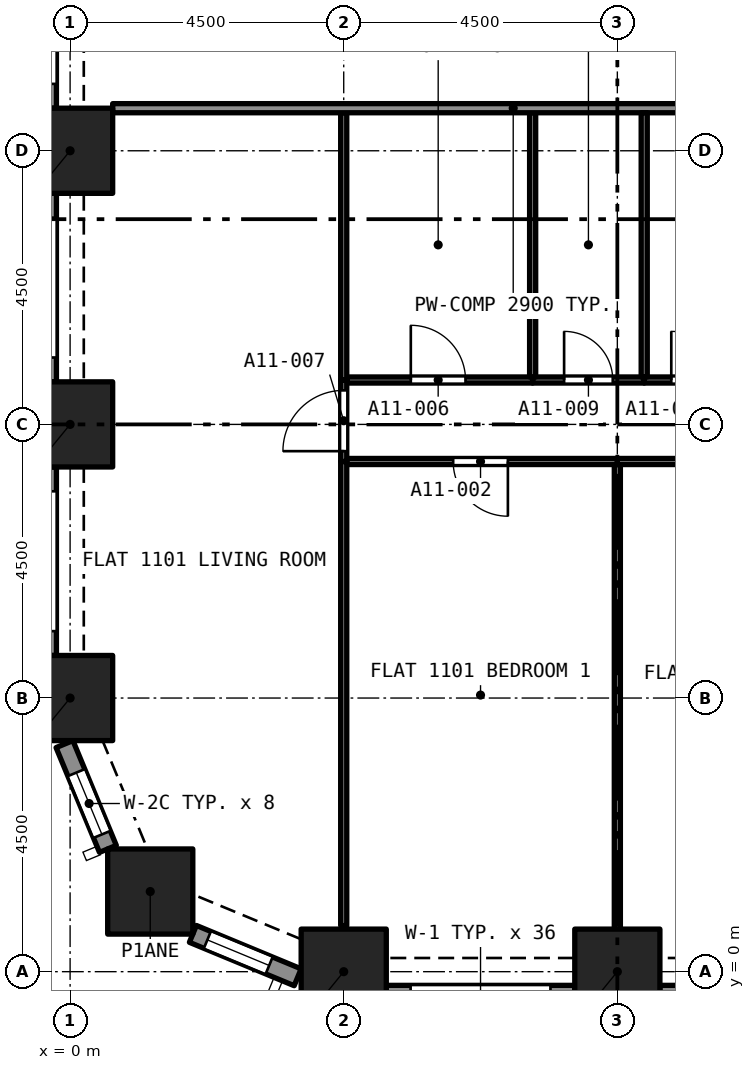
"""IFC4 building model, lengths in metres.
Left out: names, types, materials, properties, quantities, classifications, styles, units other than length and angle.
Written with IfcOpenShell. Run it as: python <this file> out.ifc"""

import sys

from ifc_helpers import new_model, si_unit, direction, frame, frame_2d, origin, origin_2d, place, context, subcontext, project, spatial, rectangle, extrude, element, fill, save


model = new_model("IFC4")
c1 = context("Model", 3, precision=1e-05, world=origin(), true_north=direction((0.0, 1.0)))
c2 = subcontext(c1, "Body", "Model", "MODEL_VIEW")
j1 = project(units=[si_unit("LENGTHUNIT", "METRE"), si_unit("PLANEANGLEUNIT", "RADIAN")], contexts=[c1])
p1 = place(None, origin())
s1 = spatial("IfcSite", under=j1, at=p1, CompositionType="ELEMENT")
p2 = place(p1, origin())
s2 = spatial("IfcBuilding", under=s1, at=p2, CompositionType="ELEMENT")
p3 = place(p2, frame((0.0, 0.0, 46.4)))
s3 = spatial("IfcBuildingStorey", under=s2, at=p3, CompositionType="ELEMENT", Elevation=46.4)
for number, where, z_axis, x_axis in (
    (1, (4.5, 0.0, 0.0), (0.0, 0.0, 1.0), (1.0, 0.0, 0.0)),
    (2, (9.0, 0.0, 0.0), (0.0, 0.0, 1.0), (1.0, 0.0, 0.0)),
    (3, (1.318, 1.318, 0.0), (0.0, 0.0, 1.0), (1.0, 0.0, 0.0)),
    (4, (0.0, 4.5, 0.0), (0.0, 0.0, 1.0), (1.0, 0.0, 0.0)),
    (5, (0.0, 9.0, 0.0), (0.0, 0.0, 1.0), (1.0, 0.0, 0.0)),
    (6, (0.0, 13.5, 0.0), (0.0, 0.0, 1.0), (1.0, 0.0, 0.0)),
):
    element("IfcColumn", number, at=place(p3, frame(where, z_axis=z_axis, x_axis=x_axis)), inside=s3, PredefinedType="COLUMN", context=c2, shape_type="SweptSolid", body=[
        extrude(rectangle(XDim=1.4, YDim=1.4, at=origin_2d()), origin(), (0.0, 0.0, 1.0), 3.2),
    ])
p4 = place(p3, frame((0.622, 2.02, 0.0), z_axis=(0.0, 0.0, 1.0), x_axis=(-0.38262540684, 0.923903565336, 0.0)))
e7 = element("IfcWall", 7, at=p4, inside=s3, PredefinedType="SOLIDWALL", context=c2, shape_type="SweptSolid", body=[
    extrude(rectangle(XDim=1.865, YDim=0.3, at=frame_2d((0.933, 0.0))), origin(), (0.0, 0.0, 1.0), 3.2),
])
p5 = place(p4, frame((0.258, 0.0, 0.45)))
e8 = element("IfcOpeningElement", 8, at=p5, cuts=e7, PredefinedType="OPENING", context=c2, shape_type="SweptSolid", body=[
    extrude(rectangle(XDim=1.1, YDim=1.95, at=frame_2d((0.55, 0.975))), frame((0.0, 0.16, 0.0), z_axis=(0.0, -1.0, 0.0), x_axis=(1.0, 0.0, 0.0)), (0.0, 0.0, 1.0), 0.32),
])
p6 = place(p3, frame((3.743, -0.092, 0.0), z_axis=(0.0, 0.0, 1.0), x_axis=(-0.923857286003, 0.382737135771, 0.0)))
e9 = element("IfcWall", 9, at=p6, inside=s3, PredefinedType="SOLIDWALL", context=c2, shape_type="SweptSolid", body=[
    extrude(rectangle(XDim=1.865, YDim=0.3, at=frame_2d((0.933, 0.0))), origin(), (0.0, 0.0, 1.0), 3.2),
])
p7 = place(p6, frame((0.508, 0.0, 0.45)))
e10 = element("IfcOpeningElement", 10, at=p7, cuts=e9, PredefinedType="OPENING", context=c2, shape_type="SweptSolid", body=[
    extrude(rectangle(XDim=1.1, YDim=1.95, at=frame_2d((0.55, 0.975))), frame((0.0, 0.16, 0.0), z_axis=(0.0, -1.0, 0.0), x_axis=(1.0, 0.0, 0.0)), (0.0, 0.0, 1.0), 0.32),
])
p8 = place(p3, frame((8.3, -0.375, 0.0), z_axis=(0.0, 0.0, 1.0), x_axis=(-1.0, 0.0, 0.0)))
e11 = element("IfcWall", 11, at=p8, inside=s3, PredefinedType="SOLIDWALL", context=c2, shape_type="SweptSolid", body=[
    extrude(rectangle(XDim=3.1, YDim=0.3, at=frame_2d((1.55, 0.0))), origin(), (0.0, 0.0, 1.0), 3.2),
])
p9 = place(p8, frame((0.4, 0.0, 0.45)))
e12 = element("IfcOpeningElement", 12, at=p9, cuts=e11, PredefinedType="OPENING", context=c2, shape_type="SweptSolid", body=[
    extrude(rectangle(XDim=2.3, YDim=1.95, at=frame_2d((1.15, 0.975))), frame((0.0, 0.16, 0.0), z_axis=(0.0, -1.0, 0.0), x_axis=(1.0, 0.0, 0.0)), (0.0, 0.0, 1.0), 0.32),
])
p10 = place(p3, frame((12.8, -0.375, 0.0), z_axis=(0.0, 0.0, 1.0), x_axis=(-1.0, 0.0, 0.0)))
e13 = element("IfcWall", 13, at=p10, inside=s3, PredefinedType="SOLIDWALL", context=c2, shape_type="SweptSolid", body=[
    extrude(rectangle(XDim=3.1, YDim=0.3, at=frame_2d((1.55, 0.0))), origin(), (0.0, 0.0, 1.0), 3.2),
])
p11 = place(p10, frame((0.4, 0.0, 0.45)))
e14 = element("IfcOpeningElement", 14, at=p11, cuts=e13, PredefinedType="OPENING", context=c2, shape_type="SweptSolid", body=[
    extrude(rectangle(XDim=2.3, YDim=1.95, at=frame_2d((1.15, 0.975))), frame((0.0, 0.16, 0.0), z_axis=(0.0, -1.0, 0.0), x_axis=(1.0, 0.0, 0.0)), (0.0, 0.0, 1.0), 0.32),
])
p12 = place(p3, frame((-0.375, 14.2, 0.0), z_axis=(0.0, 0.0, 1.0), x_axis=(0.0, 1.0, 0.0)))
e15 = element("IfcWall", 15, at=p12, inside=s3, PredefinedType="SOLIDWALL", context=c2, shape_type="SweptSolid", body=[
    extrude(rectangle(XDim=3.1, YDim=0.3, at=frame_2d((1.55, 0.0))), origin(), (0.0, 0.0, 1.0), 3.2),
])
p13 = place(p12, frame((0.4, 0.0, 0.45)))
e16 = element("IfcOpeningElement", 16, at=p13, cuts=e15, PredefinedType="OPENING", context=c2, shape_type="SweptSolid", body=[
    extrude(rectangle(XDim=2.3, YDim=1.95, at=frame_2d((1.15, 0.975))), frame((0.0, 0.16, 0.0), z_axis=(0.0, -1.0, 0.0), x_axis=(1.0, 0.0, 0.0)), (0.0, 0.0, 1.0), 0.32),
])
p14 = place(p3, frame((-0.375, 9.7, 0.0), z_axis=(0.0, 0.0, 1.0), x_axis=(0.0, 1.0, 0.0)))
e17 = element("IfcWall", 17, at=p14, inside=s3, PredefinedType="SOLIDWALL", context=c2, shape_type="SweptSolid", body=[
    extrude(rectangle(XDim=3.1, YDim=0.3, at=frame_2d((1.55, 0.0))), origin(), (0.0, 0.0, 1.0), 3.2),
])
p15 = place(p14, frame((0.4, 0.0, 0.45)))
e18 = element("IfcOpeningElement", 18, at=p15, cuts=e17, PredefinedType="OPENING", context=c2, shape_type="SweptSolid", body=[
    extrude(rectangle(XDim=2.3, YDim=1.95, at=frame_2d((1.15, 0.975))), frame((0.0, 0.16, 0.0), z_axis=(0.0, -1.0, 0.0), x_axis=(1.0, 0.0, 0.0)), (0.0, 0.0, 1.0), 0.32),
])
p16 = place(p3, frame((-0.375, 5.2, 0.0), z_axis=(0.0, 0.0, 1.0), x_axis=(0.0, 1.0, 0.0)))
e19 = element("IfcWall", 19, at=p16, inside=s3, PredefinedType="SOLIDWALL", context=c2, shape_type="SweptSolid", body=[
    extrude(rectangle(XDim=3.1, YDim=0.3, at=frame_2d((1.55, 0.0))), origin(), (0.0, 0.0, 1.0), 3.2),
])
p17 = place(p16, frame((0.4, 0.0, 0.45)))
e20 = element("IfcOpeningElement", 20, at=p17, cuts=e19, PredefinedType="OPENING", context=c2, shape_type="SweptSolid", body=[
    extrude(rectangle(XDim=2.3, YDim=1.95, at=frame_2d((1.15, 0.975))), frame((0.0, 0.16, 0.0), z_axis=(0.0, -1.0, 0.0), x_axis=(1.0, 0.0, 0.0)), (0.0, 0.0, 1.0), 0.32),
])
p18 = place(p3, frame((9.0, 0.7, 0.0), z_axis=(0.0, 0.0, 1.0), x_axis=(0.0, 1.0, 0.0)))
e21 = element("IfcWall", 21, at=p18, inside=s3, PredefinedType="PARTITIONING", context=c2, shape_type="SweptSolid", body=[
    extrude(rectangle(XDim=7.64, YDim=0.1, at=frame_2d((3.82, 0.0))), origin(), (0.0, 0.0, 1.0), 2.9),
])
p19 = place(p3, frame((9.0, 8.39, 0.0), z_axis=(0.0, 0.0, 1.0), x_axis=(-1.0, 0.0, 0.0)))
e22 = element("IfcWall", 22, at=p19, inside=s3, PredefinedType="PARTITIONING", context=c2, shape_type="SweptSolid", body=[
    extrude(rectangle(XDim=4.45, YDim=0.1, at=frame_2d((2.225, 0.0))), origin(), (0.0, 0.0, 1.0), 2.9),
])
p20 = place(p19, frame((1.8, 0.0, 0.0)))
e23 = element("IfcOpeningElement", 23, at=p20, cuts=e22, PredefinedType="OPENING", context=c2, shape_type="SweptSolid", body=[
    extrude(rectangle(XDim=0.9, YDim=2.1, at=frame_2d((0.45, 1.05))), frame((0.0, 0.06, 0.0), z_axis=(0.0, -1.0, 0.0), x_axis=(1.0, 0.0, 0.0)), (0.0, 0.0, 1.0), 0.12),
])
p21 = place(p3, frame((4.5, 0.758, 0.0), z_axis=(0.0, 0.0, 1.0), x_axis=(0.0, 1.0, 0.0)))
e24 = element("IfcWall", 24, at=p21, inside=s3, PredefinedType="PARTITIONING", context=c2, shape_type="SweptSolid", body=[
    extrude(rectangle(XDim=7.632, YDim=0.1, at=frame_2d((3.816, 0.0))), origin(), (0.0, 0.0, 1.0), 2.9),
])
p22 = place(p3, frame((13.5, 8.39, 0.0), z_axis=(0.0, 0.0, 1.0), x_axis=(-1.0, 0.0, 0.0)))
e25 = element("IfcWall", 25, at=p22, inside=s3, PredefinedType="PARTITIONING", context=c2, shape_type="SweptSolid", body=[
    extrude(rectangle(XDim=4.5, YDim=0.1, at=frame_2d((2.25, 0.0))), origin(), (0.0, 0.0, 1.0), 2.9),
])
p23 = place(p22, frame((1.8, 0.0, 0.0)))
e26 = element("IfcOpeningElement", 26, at=p23, cuts=e25, PredefinedType="OPENING", context=c2, shape_type="SweptSolid", body=[
    extrude(rectangle(XDim=0.9, YDim=2.1, at=frame_2d((0.45, 1.05))), frame((0.0, 0.06, 0.0), z_axis=(0.0, -1.0, 0.0), x_axis=(1.0, 0.0, 0.0)), (0.0, 0.0, 1.0), 0.12),
])
p24 = place(p3, frame((4.55, 9.73, 0.0), z_axis=(0.0, 0.0, 1.0), x_axis=(1.0, 0.0, 0.0)))
e27 = element("IfcWall", 27, at=p24, inside=s3, PredefinedType="PARTITIONING", context=c2, shape_type="SweptSolid", body=[
    extrude(rectangle(XDim=3.057, YDim=0.1, at=frame_2d((1.528, 0.0))), origin(), (0.0, 0.0, 1.0), 2.9),
])
p25 = place(p24, frame((1.053, 0.0, 0.0)))
e28 = element("IfcOpeningElement", 28, at=p25, cuts=e27, PredefinedType="OPENING", context=c2, shape_type="SweptSolid", body=[
    extrude(rectangle(XDim=0.9, YDim=2.1, at=frame_2d((0.45, 1.05))), frame((0.0, 0.06, 0.0), z_axis=(0.0, -1.0, 0.0), x_axis=(1.0, 0.0, 0.0)), (0.0, 0.0, 1.0), 0.12),
])
p26 = place(p3, frame((4.5, 8.39, 0.0), z_axis=(0.0, 0.0, 1.0), x_axis=(0.0, 1.0, 0.0)))
e29 = element("IfcWall", 29, at=p26, inside=s3, PredefinedType="PARTITIONING", context=c2, shape_type="SweptSolid", body=[
    extrude(rectangle(XDim=1.34, YDim=0.1, at=frame_2d((0.67, 0.0))), origin(), (0.0, 0.0, 1.0), 2.9),
])
p27 = place(p26, frame((0.17, 0.0, 0.0)))
e30 = element("IfcOpeningElement", 30, at=p27, cuts=e29, PredefinedType="OPENING", context=c2, shape_type="SweptSolid", body=[
    extrude(rectangle(XDim=1.0, YDim=2.1, at=frame_2d((0.5, 1.05))), frame((0.0, 0.06, 0.0), z_axis=(0.0, -1.0, 0.0), x_axis=(1.0, 0.0, 0.0)), (0.0, 0.0, 1.0), 0.12),
])
p28 = place(p3, frame((9.442, 9.73, 0.0), z_axis=(0.0, 0.0, 1.0), x_axis=(1.0, 0.0, 0.0)))
e31 = element("IfcWall", 31, at=p28, inside=s3, PredefinedType="PARTITIONING", context=c2, shape_type="SweptSolid", body=[
    extrude(rectangle(XDim=1.689, YDim=0.1, at=frame_2d((0.845, 0.0))), origin(), (0.0, 0.0, 1.0), 2.9),
])
p29 = place(p28, frame((0.445, 0.0, 0.0)))
e32 = element("IfcOpeningElement", 32, at=p29, cuts=e31, PredefinedType="OPENING", context=c2, shape_type="SweptSolid", body=[
    extrude(rectangle(XDim=0.8, YDim=2.1, at=frame_2d((0.4, 1.05))), frame((0.0, 0.06, 0.0), z_axis=(0.0, -1.0, 0.0), x_axis=(1.0, 0.0, 0.0)), (0.0, 0.0, 1.0), 0.12),
])
p30 = place(p3, frame((7.607, 9.73, 0.0), z_axis=(0.0, 0.0, 1.0), x_axis=(1.0, 0.0, 0.0)))
e33 = element("IfcWall", 33, at=p30, inside=s3, PredefinedType="PARTITIONING", context=c2, shape_type="SweptSolid", body=[
    extrude(rectangle(XDim=1.836, YDim=0.1, at=frame_2d((0.918, 0.0))), origin(), (0.0, 0.0, 1.0), 2.9),
])
p31 = place(p30, frame((0.518, 0.0, 0.0)))
e34 = element("IfcOpeningElement", 34, at=p31, cuts=e33, PredefinedType="OPENING", context=c2, shape_type="SweptSolid", body=[
    extrude(rectangle(XDim=0.8, YDim=2.1, at=frame_2d((0.4, 1.05))), frame((0.0, 0.06, 0.0), z_axis=(0.0, -1.0, 0.0), x_axis=(1.0, 0.0, 0.0)), (0.0, 0.0, 1.0), 0.12),
])
p32 = place(p3, frame((4.5, 9.73, 0.0), z_axis=(0.0, 0.0, 1.0), x_axis=(0.0, 1.0, 0.0)))
e35 = element("IfcWall", 35, at=p32, inside=s3, PredefinedType="PARTITIONING", context=c2, shape_type="SweptSolid", body=[
    extrude(rectangle(XDim=4.395, YDim=0.1, at=frame_2d((2.198, 0.0))), origin(), (0.0, 0.0, 1.0), 2.9),
])
p33 = place(p3, frame((7.607, 9.78, 0.0), z_axis=(0.0, 0.0, 1.0), x_axis=(0.0, 1.0, 0.0)))
e36 = element("IfcWall", 36, at=p33, inside=s3, PredefinedType="PARTITIONING", context=c2, shape_type="SweptSolid", body=[
    extrude(rectangle(XDim=4.345, YDim=0.1, at=frame_2d((2.172, 0.0))), origin(), (0.0, 0.0, 1.0), 2.9),
])
p34 = place(p3, frame((0.7, 14.2, 0.0), z_axis=(0.0, 0.0, 1.0), x_axis=(1.0, 0.0, 0.0)))
e37 = element("IfcWall", 37, at=p34, inside=s3, PredefinedType="PARTITIONING", context=c2, shape_type="SweptSolid", body=[
    extrude(rectangle(XDim=13.175, YDim=0.15, at=frame_2d((6.587, 0.0))), origin(), (0.0, 0.0, 1.0), 2.9),
])
p35 = place(p3, frame((9.442, 9.78, 0.0), z_axis=(0.0, 0.0, 1.0), x_axis=(0.0, 1.0, 0.0)))
e38 = element("IfcWall", 38, at=p35, inside=s3, PredefinedType="PARTITIONING", context=c2, shape_type="SweptSolid", body=[
    extrude(rectangle(XDim=4.345, YDim=0.1, at=frame_2d((2.172, 0.0))), origin(), (0.0, 0.0, 1.0), 2.9),
])
p36 = place(p5, origin())
e39 = element("IfcWindow", 39, at=p36, inside=s3, PartitioningType="SINGLE_PANEL", PredefinedType="WINDOW", context=c2, shape_type="SweptSolid", body=[
    extrude(rectangle(XDim=1.1, YDim=1.95, at=frame_2d((0.55, 0.975))), frame((0.0, 0.03, 0.0), z_axis=(0.0, -1.0, 0.0), x_axis=(1.0, 0.0, 0.0)), (0.0, 0.0, 1.0), 0.06),
])
fill(e8, e39)
p37 = place(p7, origin())
e40 = element("IfcWindow", 40, at=p37, inside=s3, PartitioningType="SINGLE_PANEL", PredefinedType="WINDOW", context=c2, shape_type="SweptSolid", body=[
    extrude(rectangle(XDim=1.1, YDim=1.95, at=frame_2d((0.55, 0.975))), frame((0.0, 0.03, 0.0), z_axis=(0.0, -1.0, 0.0), x_axis=(1.0, 0.0, 0.0)), (0.0, 0.0, 1.0), 0.06),
])
fill(e10, e40)
p38 = place(p20, origin())
e41 = element("IfcDoor", 41, at=p38, inside=s3, OperationType="SINGLE_SWING_RIGHT", PredefinedType="DOOR", context=c2, shape_type="SweptSolid", body=[
    extrude(rectangle(XDim=0.9, YDim=2.1, at=frame_2d((0.45, 1.05))), frame((0.0, 0.025, 0.0), z_axis=(0.0, -1.0, 0.0), x_axis=(1.0, 0.0, 0.0)), (0.0, 0.0, 1.0), 0.05),
])
fill(e23, e41)
p39 = place(p25, origin())
e42 = element("IfcDoor", 42, at=p39, inside=s3, OperationType="SINGLE_SWING_LEFT", PredefinedType="DOOR", context=c2, shape_type="SweptSolid", body=[
    extrude(rectangle(XDim=0.9, YDim=2.1, at=frame_2d((0.45, 1.05))), frame((0.0, 0.025, 0.0), z_axis=(0.0, -1.0, 0.0), x_axis=(1.0, 0.0, 0.0)), (0.0, 0.0, 1.0), 0.05),
])
fill(e28, e42)
p40 = place(p27, origin())
e43 = element("IfcDoor", 43, at=p40, inside=s3, OperationType="SINGLE_SWING_RIGHT", PredefinedType="DOOR", context=c2, shape_type="SweptSolid", body=[
    extrude(rectangle(XDim=1.0, YDim=2.1, at=frame_2d((0.5, 1.05))), frame((0.0, 0.025, 0.0), z_axis=(0.0, -1.0, 0.0), x_axis=(1.0, 0.0, 0.0)), (0.0, 0.0, 1.0), 0.05),
])
fill(e30, e43)
p41 = place(p29, origin())
e44 = element("IfcDoor", 44, at=p41, inside=s3, OperationType="SINGLE_SWING_LEFT", PredefinedType="DOOR", context=c2, shape_type="SweptSolid", body=[
    extrude(rectangle(XDim=0.8, YDim=2.1, at=frame_2d((0.4, 1.05))), frame((0.0, 0.025, 0.0), z_axis=(0.0, -1.0, 0.0), x_axis=(1.0, 0.0, 0.0)), (0.0, 0.0, 1.0), 0.05),
])
fill(e32, e44)
p42 = place(p31, origin())
e45 = element("IfcDoor", 45, at=p42, inside=s3, OperationType="SINGLE_SWING_RIGHT", PredefinedType="DOOR", context=c2, shape_type="SweptSolid", body=[
    extrude(rectangle(XDim=0.8, YDim=2.1, at=frame_2d((0.4, 1.05))), frame((0.0, 0.025, 0.0), z_axis=(0.0, -1.0, 0.0), x_axis=(1.0, 0.0, 0.0)), (0.0, 0.0, 1.0), 0.05),
])
fill(e34, e45)
save(model, sys.argv[1])
